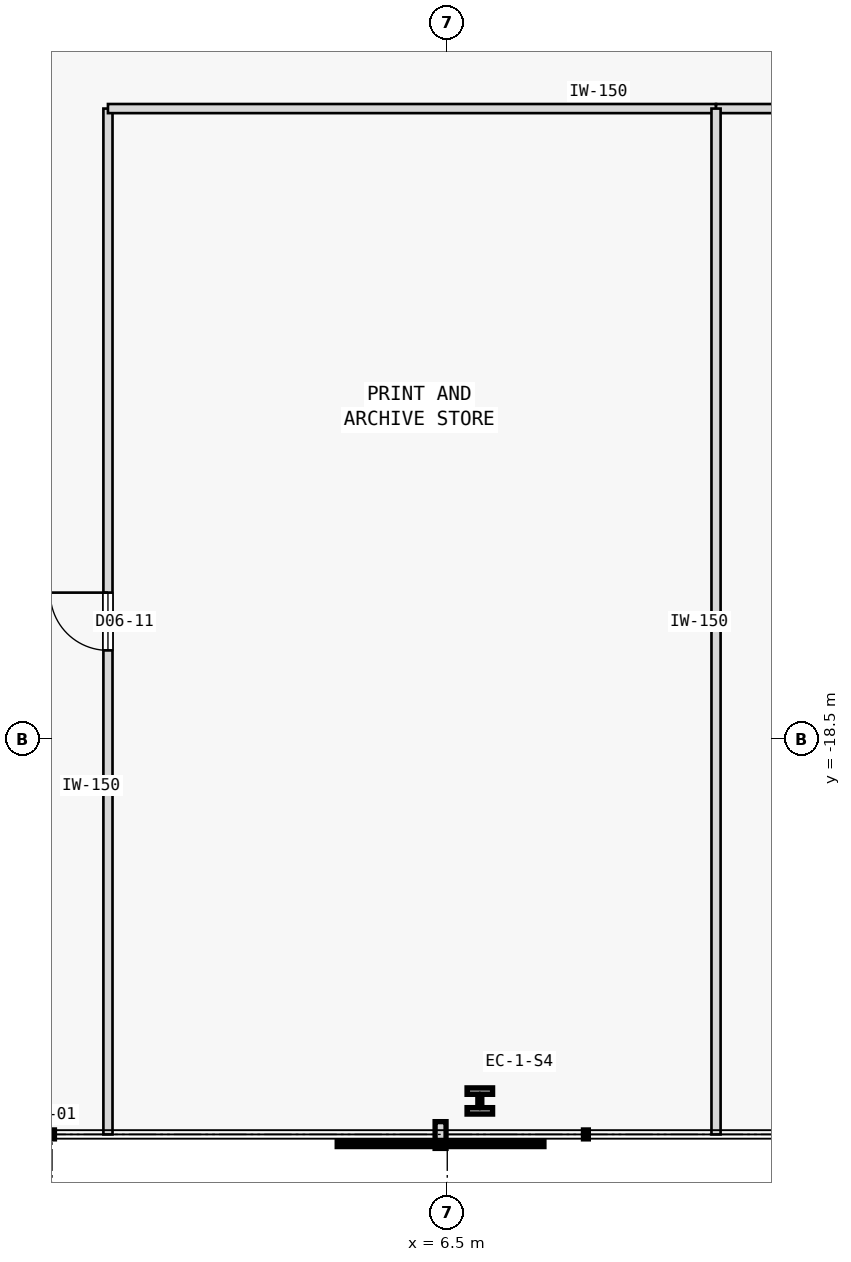
"""IFC4 building model, lengths in metres.
Left out: names, types, materials, properties, quantities, classifications, styles, units other than length and angle.
Written with IfcOpenShell. Run it as: python <this file> out.ifc"""

import sys

from ifc_helpers import new_model, si_unit, direction, frame, frame_2d, origin, origin_2d, place, context, subcontext, project, spatial, rectangle, i_section, extrude, element, fill, save


model = new_model("IFC4")
c1 = context("Model", 3, precision=1e-05, world=origin(), true_north=direction((0.0, 1.0)))
c2 = subcontext(c1, "Body", "Model", "MODEL_VIEW")
j1 = project(units=[si_unit("LENGTHUNIT", "METRE"), si_unit("PLANEANGLEUNIT", "RADIAN")], contexts=[c1])
p1 = place(None, origin())
s1 = spatial("IfcSite", under=j1, at=p1, CompositionType="ELEMENT")
p2 = place(p1, origin())
s2 = spatial("IfcBuilding", under=s1, at=p2, CompositionType="ELEMENT")
p3 = place(p2, frame((0.0, 0.0, 29.4)))
s3 = spatial("IfcBuildingStorey", under=s2, at=p3, CompositionType="ELEMENT", Elevation=29.4)
p4 = place(p3, frame((7.036, -24.45, 0.0), z_axis=(0.0, 0.0, 1.0), x_axis=(1.0, 0.0, 0.0)))
e1 = element("IfcColumn", 1, at=p4, inside=s3, PredefinedType="COLUMN", context=c2, shape_type="SweptSolid", body=[
    extrude(i_section(OverallWidth=0.42, OverallDepth=0.431, WebThickness=0.065, FlangeThickness=0.106, FilletRadius=0.015, at=origin_2d()), origin(), (0.0, 0.0, 1.0), 3.8),
])
p5 = place(p3, frame((0.92, -25.0, 0.0), z_axis=(0.0, 0.0, 1.0), x_axis=(0.0, 1.0, 0.0)))
e2 = element("IfcWall", 2, at=p5, inside=s3, PredefinedType="PARTITIONING", context=c2, shape_type="SweptSolid", body=[
    extrude(rectangle(XDim=16.87, YDim=0.15, at=frame_2d((8.435, 0.0))), origin(), (0.0, 0.0, 1.0), 3.575),
])
p6 = place(p5, frame((7.96, 0.0, 0.0)))
e3 = element("IfcOpeningElement", 3, at=p6, cuts=e2, PredefinedType="OPENING", context=c2, shape_type="SweptSolid", body=[
    extrude(rectangle(XDim=0.95, YDim=2.15, at=frame_2d((0.475, 1.075))), frame((0.0, 0.085, 0.0), z_axis=(0.0, -1.0, 0.0), x_axis=(1.0, 0.0, 0.0)), (0.0, 0.0, 1.0), 0.17),
])
p7 = place(p3, frame((0.92, -8.13, 0.0), z_axis=(0.0, 0.0, 1.0), x_axis=(1.0, 0.0, 0.0)))
e4 = element("IfcWall", 4, at=p7, inside=s3, PredefinedType="PARTITIONING", context=c2, shape_type="SweptSolid", body=[
    extrude(rectangle(XDim=10.0, YDim=0.15, at=frame_2d((5.0, 0.0))), origin(), (0.0, 0.0, 1.0), 3.575),
])
p8 = place(p3, frame((10.92, -8.13, 0.0), z_axis=(0.0, 0.0, 1.0), x_axis=(1.0, 0.0, 0.0)))
e5 = element("IfcWall", 5, at=p8, inside=s3, PredefinedType="PARTITIONING", context=c2, shape_type="SweptSolid", body=[
    extrude(rectangle(XDim=6.139, YDim=0.15, at=frame_2d((3.07, 0.0))), origin(), (0.0, 0.0, 1.0), 3.575),
])
p9 = place(p8, frame((2.594, 0.0, 0.0)))
e6 = element("IfcOpeningElement", 6, at=p9, cuts=e5, PredefinedType="OPENING", context=c2, shape_type="SweptSolid", body=[
    extrude(rectangle(XDim=0.95, YDim=2.15, at=frame_2d((0.475, 1.075))), frame((0.0, 0.085, 0.0), z_axis=(0.0, -1.0, 0.0), x_axis=(1.0, 0.0, 0.0)), (0.0, 0.0, 1.0), 0.17),
])
p10 = place(p3, frame((10.92, -25.0, 0.0), z_axis=(0.0, 0.0, 1.0), x_axis=(0.0, 1.0, 0.0)))
e7 = element("IfcWall", 7, at=p10, inside=s3, PredefinedType="PARTITIONING", context=c2, shape_type="SweptSolid", body=[
    extrude(rectangle(XDim=16.87, YDim=0.15, at=frame_2d((8.435, 0.0))), origin(), (0.0, 0.0, 1.0), 3.575),
])
p11 = place(p6, origin())
e8 = element("IfcDoor", 8, at=p11, inside=s3, OperationType="SINGLE_SWING_RIGHT", PredefinedType="DOOR", context=c2, shape_type="SweptSolid", body=[
    extrude(rectangle(XDim=0.95, YDim=2.15, at=frame_2d((0.475, 1.075))), frame((0.0, 0.025, 0.0), z_axis=(0.0, -1.0, 0.0), x_axis=(1.0, 0.0, 0.0)), (0.0, 0.0, 1.0), 0.05),
])
fill(e3, e8)
save(model, sys.argv[1])
